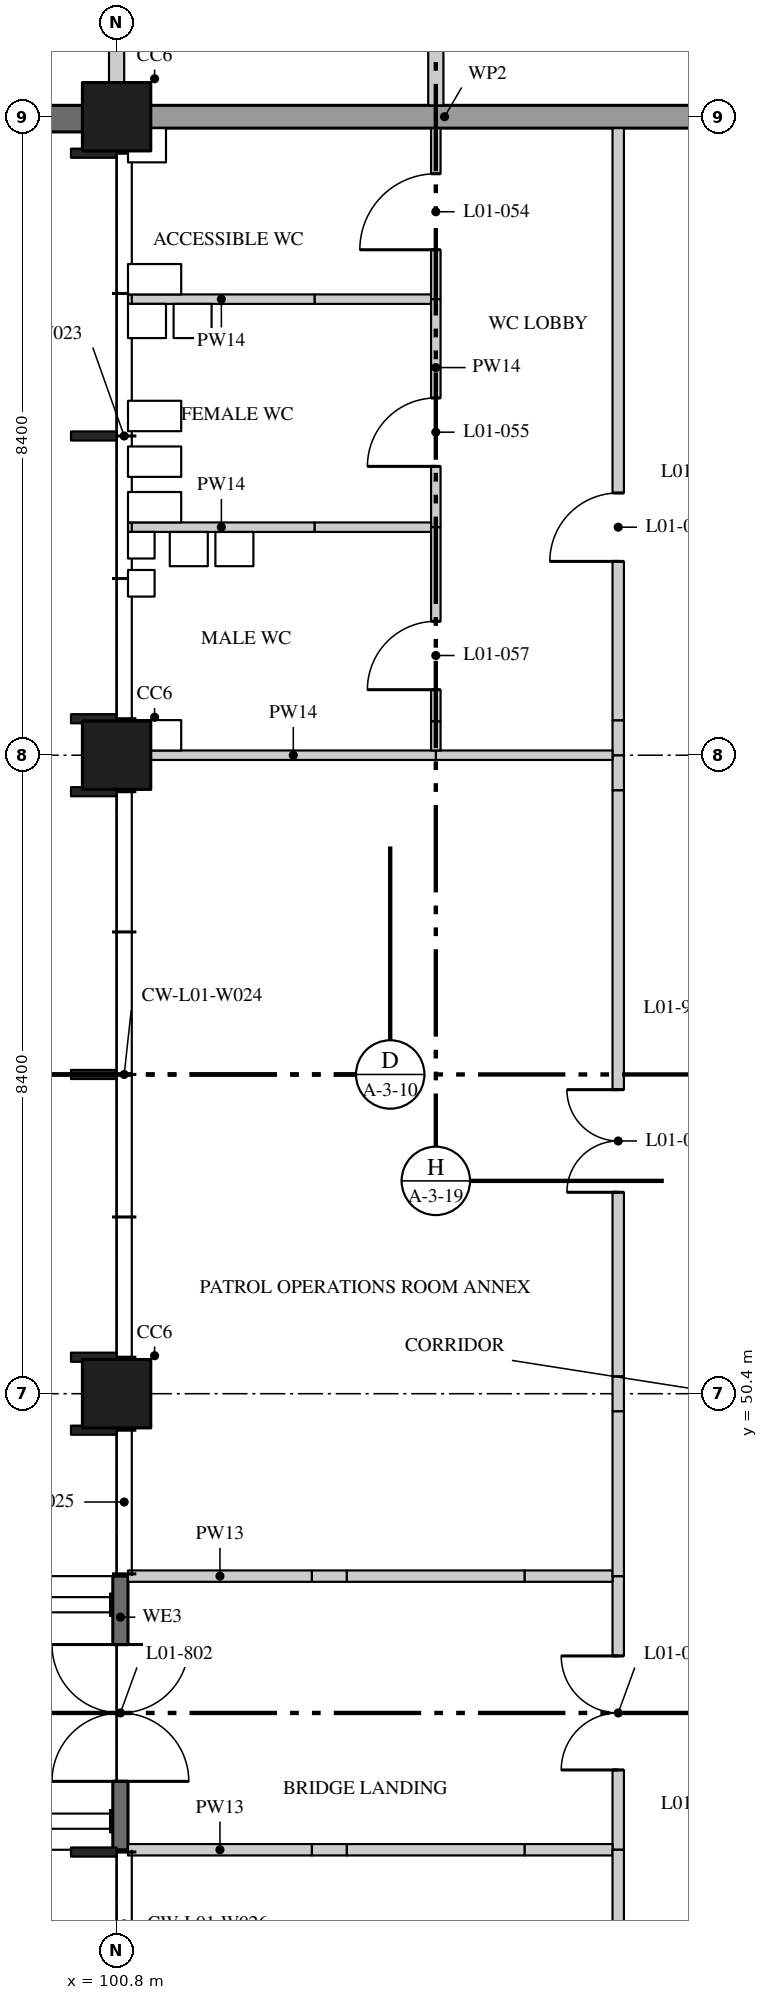
"""IFC4 building model, lengths in metres.
Left out: names, types, materials, properties, quantities, classifications, styles, units other than length and angle.
Written with IfcOpenShell. Run it as: python <this file> out.ifc"""

import sys

from ifc_helpers import new_model, si_unit, direction, frame, frame_2d, origin, origin_2d, place, context, subcontext, project, spatial, rectangle, extrude, element, fill, save


model = new_model("IFC4")
c1 = context("Model", 3, precision=1e-05, world=origin(), true_north=direction((0.0, 1.0)))
c2 = subcontext(c1, "Body", "Model", "MODEL_VIEW")
j1 = project(units=[si_unit("LENGTHUNIT", "METRE"), si_unit("PLANEANGLEUNIT", "RADIAN")], contexts=[c1])
p1 = place(None, origin())
s1 = spatial("IfcSite", under=j1, at=p1, CompositionType="ELEMENT")
p2 = place(p1, origin())
s2 = spatial("IfcBuilding", under=s1, at=p2, CompositionType="ELEMENT")
p3 = place(p2, frame((0.0, 0.0, 5.4)))
s3 = spatial("IfcBuildingStorey", under=s2, at=p3, CompositionType="ELEMENT", Elevation=5.4)
for number, where, z_axis, x_axis in (
    (1, (100.8, 50.4, 0.0), (0.0, 0.0, 1.0), (1.0, 0.0, 0.0)),
    (2, (100.8, 58.8, 0.0), (0.0, 0.0, 1.0), (1.0, 0.0, 0.0)),
    (3, (100.8, 67.2, 0.0), (0.0, 0.0, 1.0), (1.0, 0.0, 0.0)),
):
    element("IfcColumn", number, at=place(p3, frame(where, z_axis=z_axis, x_axis=x_axis)), inside=s3, PredefinedType="COLUMN", context=c2, shape_type="SweptSolid", body=[
        extrude(rectangle(XDim=0.9, YDim=0.9, at=origin_2d()), origin(), (0.0, 0.0, 1.0), 4.37),
    ])
p4 = place(p3, frame((107.4, 44.4, 0.0), z_axis=(0.0, 0.0, 1.0), x_axis=(0.0, 1.0, 0.0)))
e4 = element("IfcWall", 4, at=p4, inside=s3, PredefinedType="PARTITIONING", context=c2, shape_type="SweptSolid", body=[
    extrude(rectangle(XDim=3.6, YDim=0.15, at=frame_2d((1.8, 0.0))), origin(), (0.0, 0.0, 1.0), 4.37),
])
p5 = place(p4, frame((1.05, 0.0, 0.0)))
e5 = element("IfcOpeningElement", 5, at=p5, cuts=e4, PredefinedType="OPENING", context=c2, shape_type="SweptSolid", body=[
    extrude(rectangle(XDim=1.5, YDim=2.1, at=frame_2d((0.75, 1.05))), frame((0.0, 0.085, 0.0), z_axis=(0.0, -1.0, 0.0), x_axis=(1.0, 0.0, 0.0)), (0.0, 0.0, 1.0), 0.17),
])
p6 = place(p3, frame((100.95, 44.4, 0.0), z_axis=(0.0, 0.0, 1.0), x_axis=(1.0, 0.0, 0.0)))
e6 = element("IfcWall", 6, at=p6, inside=s3, PredefinedType="PARTITIONING", context=c2, shape_type="SweptSolid", body=[
    extrude(rectangle(XDim=2.42, YDim=0.15, at=frame_2d((1.21, 0.0))), origin(), (0.0, 0.0, 1.0), 4.37),
])
p7 = place(p3, frame((103.37, 44.4, 0.0), z_axis=(0.0, 0.0, 1.0), x_axis=(1.0, 0.0, 0.0)))
e7 = element("IfcWall", 7, at=p7, inside=s3, PredefinedType="PARTITIONING", context=c2, shape_type="SweptSolid", body=[
    extrude(rectangle(XDim=0.46, YDim=0.15, at=frame_2d((0.23, 0.0))), origin(), (0.0, 0.0, 1.0), 3.895),
])
p8 = place(p3, frame((103.83, 44.4, 0.0), z_axis=(0.0, 0.0, 1.0), x_axis=(1.0, 0.0, 0.0)))
e8 = element("IfcWall", 8, at=p8, inside=s3, PredefinedType="PARTITIONING", context=c2, shape_type="SweptSolid", body=[
    extrude(rectangle(XDim=2.34, YDim=0.15, at=frame_2d((1.17, 0.0))), origin(), (0.0, 0.0, 1.0), 4.37),
])
p9 = place(p3, frame((106.17, 44.4, 0.0), z_axis=(0.0, 0.0, 1.0), x_axis=(1.0, 0.0, 0.0)))
e9 = element("IfcWall", 9, at=p9, inside=s3, PredefinedType="PARTITIONING", context=c2, shape_type="SweptSolid", body=[
    extrude(rectangle(XDim=1.155, YDim=0.15, at=frame_2d((0.578, 0.0))), origin(), (0.0, 0.0, 1.0), 3.895),
])
p10 = place(p3, frame((100.95, 48.0, 0.0), z_axis=(0.0, 0.0, 1.0), x_axis=(1.0, 0.0, 0.0)))
e10 = element("IfcWall", 10, at=p10, inside=s3, PredefinedType="PARTITIONING", context=c2, shape_type="SweptSolid", body=[
    extrude(rectangle(XDim=2.42, YDim=0.15, at=frame_2d((1.21, 0.0))), origin(), (0.0, 0.0, 1.0), 4.37),
])
p11 = place(p3, frame((103.37, 48.0, 0.0), z_axis=(0.0, 0.0, 1.0), x_axis=(1.0, 0.0, 0.0)))
e11 = element("IfcWall", 11, at=p11, inside=s3, PredefinedType="PARTITIONING", context=c2, shape_type="SweptSolid", body=[
    extrude(rectangle(XDim=0.46, YDim=0.15, at=frame_2d((0.23, 0.0))), origin(), (0.0, 0.0, 1.0), 3.895),
])
p12 = place(p3, frame((103.83, 48.0, 0.0), z_axis=(0.0, 0.0, 1.0), x_axis=(1.0, 0.0, 0.0)))
e12 = element("IfcWall", 12, at=p12, inside=s3, PredefinedType="PARTITIONING", context=c2, shape_type="SweptSolid", body=[
    extrude(rectangle(XDim=2.34, YDim=0.15, at=frame_2d((1.17, 0.0))), origin(), (0.0, 0.0, 1.0), 4.37),
])
p13 = place(p3, frame((106.17, 48.0, 0.0), z_axis=(0.0, 0.0, 1.0), x_axis=(1.0, 0.0, 0.0)))
e13 = element("IfcWall", 13, at=p13, inside=s3, PredefinedType="PARTITIONING", context=c2, shape_type="SweptSolid", body=[
    extrude(rectangle(XDim=1.155, YDim=0.15, at=frame_2d((0.578, 0.0))), origin(), (0.0, 0.0, 1.0), 3.895),
])
for number, where, z_axis, x_axis in (
    (14, (107.4, 42.23, 0.0), (0.0, 0.0, 1.0), (0.0, 1.0, 0.0)),
    (15, (107.4, 48.0, 0.0), (0.0, 0.0, 1.0), (0.0, 1.0, 0.0)),
):
    element("IfcWall", number, at=place(p3, frame(where, z_axis=z_axis, x_axis=x_axis)), inside=s3, PredefinedType="PARTITIONING", context=c2, shape_type="SweptSolid", body=[
        extrude(rectangle(XDim=2.17, YDim=0.15, at=frame_2d((1.085, 0.0))), origin(), (0.0, 0.0, 1.0), 4.37),
    ])
p14 = place(p3, frame((107.4, 50.17, 0.0), z_axis=(0.0, 0.0, 1.0), x_axis=(0.0, 1.0, 0.0)))
e16 = element("IfcWall", 16, at=p14, inside=s3, PredefinedType="PARTITIONING", context=c2, shape_type="SweptSolid", body=[
    extrude(rectangle(XDim=0.46, YDim=0.15, at=frame_2d((0.23, 0.0))), origin(), (0.0, 0.0, 1.0), 3.746),
])
p15 = place(p3, frame((107.4, 50.63, 0.0), z_axis=(0.0, 0.0, 1.0), x_axis=(0.0, 1.0, 0.0)))
e17 = element("IfcWall", 17, at=p15, inside=s3, PredefinedType="PARTITIONING", context=c2, shape_type="SweptSolid", body=[
    extrude(rectangle(XDim=7.71, YDim=0.15, at=frame_2d((3.855, 0.0))), origin(), (0.0, 0.0, 1.0), 4.37),
])
p16 = place(p15, frame((2.42, 0.0, 0.0)))
e18 = element("IfcOpeningElement", 18, at=p16, cuts=e17, PredefinedType="OPENING", context=c2, shape_type="SweptSolid", body=[
    extrude(rectangle(XDim=1.35, YDim=2.1, at=frame_2d((0.675, 1.05))), frame((0.0, 0.085, 0.0), z_axis=(0.0, -1.0, 0.0), x_axis=(1.0, 0.0, 0.0)), (0.0, 0.0, 1.0), 0.17),
])
for number, where, z_axis, x_axis in (
    (19, (107.4, 58.34, 0.0), (0.0, 0.0, 1.0), (0.0, 1.0, 0.0)),
    (20, (107.4, 58.8, 0.0), (0.0, 0.0, 1.0), (0.0, 1.0, 0.0)),
):
    element("IfcWall", number, at=place(p3, frame(where, z_axis=z_axis, x_axis=x_axis)), inside=s3, PredefinedType="PARTITIONING", context=c2, shape_type="SweptSolid", body=[
        extrude(rectangle(XDim=0.46, YDim=0.15, at=frame_2d((0.23, 0.0))), origin(), (0.0, 0.0, 1.0), 3.746),
    ])
p17 = place(p3, frame((107.4, 59.26, 0.0), z_axis=(0.0, 0.0, 1.0), x_axis=(0.0, 1.0, 0.0)))
e21 = element("IfcWall", 21, at=p17, inside=s3, PredefinedType="PARTITIONING", context=c2, shape_type="SweptSolid", body=[
    extrude(rectangle(XDim=7.79, YDim=0.15, at=frame_2d((3.895, 0.0))), origin(), (0.0, 0.0, 1.0), 4.37),
])
p18 = place(p17, frame((2.09, 0.0, 0.0)))
e22 = element("IfcOpeningElement", 22, at=p18, cuts=e21, PredefinedType="OPENING", context=c2, shape_type="SweptSolid", body=[
    extrude(rectangle(XDim=0.9, YDim=2.1, at=frame_2d((0.45, 1.05))), frame((0.0, 0.085, 0.0), z_axis=(0.0, -1.0, 0.0), x_axis=(1.0, 0.0, 0.0)), (0.0, 0.0, 1.0), 0.17),
])
p19 = place(p3, frame((105.0, 58.8, 0.0), z_axis=(0.0, 0.0, 1.0), x_axis=(1.0, 0.0, 0.0)))
e23 = element("IfcWall", 23, at=p19, inside=s3, PredefinedType="PARTITIONING", context=c2, shape_type="SweptSolid", body=[
    extrude(rectangle(XDim=2.325, YDim=0.125, at=frame_2d((1.163, 0.0))), origin(), (0.0, 0.0, 1.0), 3.746),
])
p20 = place(p3, frame((101.25, 58.8, 0.0), z_axis=(0.0, 0.0, 1.0), x_axis=(1.0, 0.0, 0.0)))
e24 = element("IfcWall", 24, at=p20, inside=s3, PredefinedType="PARTITIONING", context=c2, shape_type="SweptSolid", body=[
    extrude(rectangle(XDim=3.75, YDim=0.125, at=frame_2d((1.875, 0.0))), origin(), (0.0, 0.0, 1.0), 3.746),
])
p21 = place(p3, frame((100.95, 64.8, 0.0), z_axis=(0.0, 0.0, 1.0), x_axis=(1.0, 0.0, 0.0)))
e25 = element("IfcWall", 25, at=p21, inside=s3, PredefinedType="PARTITIONING", context=c2, shape_type="SweptSolid", body=[
    extrude(rectangle(XDim=2.457, YDim=0.125, at=frame_2d((1.229, 0.0))), origin(), (0.0, 0.0, 1.0), 4.37),
])
p22 = place(p3, frame((103.407, 64.8, 0.0), z_axis=(0.0, 0.0, 1.0), x_axis=(1.0, 0.0, 0.0)))
e26 = element("IfcWall", 26, at=p22, inside=s3, PredefinedType="PARTITIONING", context=c2, shape_type="SweptSolid", body=[
    extrude(rectangle(XDim=1.531, YDim=0.125, at=frame_2d((0.766, 0.0))), origin(), (0.0, 0.0, 1.0), 3.895),
])
p23 = place(p3, frame((105.0, 64.8, 0.0), z_axis=(0.0, 0.0, 1.0), x_axis=(0.0, 1.0, 0.0)))
e27 = element("IfcWall", 27, at=p23, inside=s3, PredefinedType="PARTITIONING", context=c2, shape_type="SweptSolid", body=[
    extrude(rectangle(XDim=2.25, YDim=0.125, at=frame_2d((1.125, 0.0))), origin(), (0.0, 0.0, 1.0), 4.37),
])
p24 = place(p23, frame((0.65, 0.0, 0.0)))
e28 = element("IfcOpeningElement", 28, at=p24, cuts=e27, PredefinedType="OPENING", context=c2, shape_type="SweptSolid", body=[
    extrude(rectangle(XDim=1.0, YDim=2.1, at=frame_2d((0.5, 1.05))), frame((0.0, 0.073, 0.0), z_axis=(0.0, -1.0, 0.0), x_axis=(1.0, 0.0, 0.0)), (0.0, 0.0, 1.0), 0.145),
])
p25 = place(p3, frame((105.0, 61.8, 0.0), z_axis=(0.0, 0.0, 1.0), x_axis=(0.0, 1.0, 0.0)))
e29 = element("IfcWall", 29, at=p25, inside=s3, PredefinedType="PARTITIONING", context=c2, shape_type="SweptSolid", body=[
    extrude(rectangle(XDim=3.0, YDim=0.125, at=frame_2d((1.5, 0.0))), origin(), (0.0, 0.0, 1.0), 4.37),
])
p26 = place(p25, frame((0.8, 0.0, 0.0)))
e30 = element("IfcOpeningElement", 30, at=p26, cuts=e29, PredefinedType="OPENING", context=c2, shape_type="SweptSolid", body=[
    extrude(rectangle(XDim=0.9, YDim=2.1, at=frame_2d((0.45, 1.05))), frame((0.0, 0.073, 0.0), z_axis=(0.0, -1.0, 0.0), x_axis=(1.0, 0.0, 0.0)), (0.0, 0.0, 1.0), 0.145),
])
p27 = place(p3, frame((100.95, 61.8, 0.0), z_axis=(0.0, 0.0, 1.0), x_axis=(1.0, 0.0, 0.0)))
e31 = element("IfcWall", 31, at=p27, inside=s3, PredefinedType="PARTITIONING", context=c2, shape_type="SweptSolid", body=[
    extrude(rectangle(XDim=2.457, YDim=0.125, at=frame_2d((1.229, 0.0))), origin(), (0.0, 0.0, 1.0), 4.37),
])
p28 = place(p3, frame((103.407, 61.8, 0.0), z_axis=(0.0, 0.0, 1.0), x_axis=(1.0, 0.0, 0.0)))
e32 = element("IfcWall", 32, at=p28, inside=s3, PredefinedType="PARTITIONING", context=c2, shape_type="SweptSolid", body=[
    extrude(rectangle(XDim=1.531, YDim=0.125, at=frame_2d((0.766, 0.0))), origin(), (0.0, 0.0, 1.0), 3.895),
])
p29 = place(p3, frame((105.0, 58.862, 0.0), z_axis=(0.0, 0.0, 1.0), x_axis=(0.0, 1.0, 0.0)))
e33 = element("IfcWall", 33, at=p29, inside=s3, PredefinedType="PARTITIONING", context=c2, shape_type="SweptSolid", body=[
    extrude(rectangle(XDim=0.385, YDim=0.125, at=frame_2d((0.192, 0.0))), origin(), (0.0, 0.0, 1.0), 3.746),
])
p30 = place(p3, frame((105.0, 59.247, 0.0), z_axis=(0.0, 0.0, 1.0), x_axis=(0.0, 1.0, 0.0)))
e34 = element("IfcWall", 34, at=p30, inside=s3, PredefinedType="PARTITIONING", context=c2, shape_type="SweptSolid", body=[
    extrude(rectangle(XDim=2.553, YDim=0.125, at=frame_2d((1.276, 0.0))), origin(), (0.0, 0.0, 1.0), 4.37),
])
p31 = place(p30, frame((0.415, 0.0, 0.0)))
e35 = element("IfcOpeningElement", 35, at=p31, cuts=e34, PredefinedType="OPENING", context=c2, shape_type="SweptSolid", body=[
    extrude(rectangle(XDim=0.9, YDim=2.1, at=frame_2d((0.45, 1.05))), frame((0.0, 0.073, 0.0), z_axis=(0.0, -1.0, 0.0), x_axis=(1.0, 0.0, 0.0)), (0.0, 0.0, 1.0), 0.145),
])
p32 = place(p3, frame((100.8, 67.65, 0.0), z_axis=(0.0, 0.0, 1.0), x_axis=(0.0, 1.0, 0.0)))
e36 = element("IfcWall", 36, at=p32, inside=s3, PredefinedType="PARTITIONING", context=c2, shape_type="SweptSolid", body=[
    extrude(rectangle(XDim=6.35, YDim=0.2, at=frame_2d((3.175, 0.0))), origin(), (0.0, 0.0, 1.0), 3.746),
])
p33 = place(p3, frame((105.0, 67.35, 0.0), z_axis=(0.0, 0.0, 1.0), x_axis=(0.0, 1.0, 0.0)))
e37 = element("IfcWall", 37, at=p33, inside=s3, PredefinedType="PARTITIONING", context=c2, shape_type="SweptSolid", body=[
    extrude(rectangle(XDim=6.65, YDim=0.2, at=frame_2d((3.325, 0.0))), origin(), (0.0, 0.0, 1.0), 4.37),
])
p34 = place(p3, frame((92.6, 67.175, 0.0), z_axis=(0.0, 0.0, 1.0), x_axis=(1.0, 0.0, 0.0)))
e38 = element("IfcWall", 38, at=p34, inside=s3, PredefinedType="SOLIDWALL", context=c2, shape_type="SweptSolid", body=[
    extrude(rectangle(XDim=7.77, YDim=0.35, at=frame_2d((3.885, 0.0))), origin(), (0.0, 0.0, 1.0), 3.746),
])
p35 = place(p34, frame((0.7, 0.0, 1.5)))
e39 = element("IfcOpeningElement", 39, at=p35, cuts=e38, PredefinedType="OPENING", context=c2, shape_type="SweptSolid", body=[
    extrude(rectangle(XDim=0.3, YDim=1.5, at=frame_2d((0.15, 0.75))), frame((0.0, 0.185, 0.0), z_axis=(0.0, -1.0, 0.0), x_axis=(1.0, 0.0, 0.0)), (0.0, 0.0, 1.0), 0.37),
])
p36 = place(p34, frame((2.35, 0.0, 1.5)))
e40 = element("IfcOpeningElement", 40, at=p36, cuts=e38, PredefinedType="OPENING", context=c2, shape_type="SweptSolid", body=[
    extrude(rectangle(XDim=1.2, YDim=1.5, at=frame_2d((0.6, 0.75))), frame((0.0, 0.185, 0.0), z_axis=(0.0, -1.0, 0.0), x_axis=(1.0, 0.0, 0.0)), (0.0, 0.0, 1.0), 0.37),
])
p37 = place(p34, frame((4.9, 0.0, 1.5)))
e41 = element("IfcOpeningElement", 41, at=p37, cuts=e38, PredefinedType="OPENING", context=c2, shape_type="SweptSolid", body=[
    extrude(rectangle(XDim=0.3, YDim=1.5, at=frame_2d((0.15, 0.75))), frame((0.0, 0.185, 0.0), z_axis=(0.0, -1.0, 0.0), x_axis=(1.0, 0.0, 0.0)), (0.0, 0.0, 1.0), 0.37),
])
p38 = place(p3, frame((100.85, 48.0, 0.0), z_axis=(0.0, 0.0, 1.0), x_axis=(0.0, -1.0, 0.0)))
e42 = element("IfcWall", 42, at=p38, inside=s3, PredefinedType="SOLIDWALL", context=c2, shape_type="SweptSolid", body=[
    extrude(rectangle(XDim=3.6, YDim=0.2, at=frame_2d((1.8, 0.0))), origin(), (0.0, 0.0, 1.0), 3.746),
])
p39 = place(p38, frame((0.9, 0.0, 0.0)))
e43 = element("IfcOpeningElement", 43, at=p39, cuts=e42, PredefinedType="OPENING", context=c2, shape_type="SweptSolid", body=[
    extrude(rectangle(XDim=1.8, YDim=2.4, at=frame_2d((0.9, 1.2))), frame((0.0, 0.11, 0.0), z_axis=(0.0, -1.0, 0.0), x_axis=(1.0, 0.0, 0.0)), (0.0, 0.0, 1.0), 0.22),
])
p40 = place(p3, frame((109.0, 67.2, 0.0), z_axis=(0.0, 0.0, 1.0), x_axis=(-1.0, 0.0, 0.0)))
e44 = element("IfcWall", 44, at=p40, inside=s3, PredefinedType="SOLIDWALL", context=c2, shape_type="SweptSolid", body=[
    extrude(rectangle(XDim=7.77, YDim=0.3, at=frame_2d((3.885, 0.0))), origin(), (0.0, 0.0, 1.0), 3.746),
])
p41 = place(p5, origin())
e45 = element("IfcDoor", 45, at=p41, inside=s3, OperationType="DOUBLE_DOOR_SINGLE_SWING", PredefinedType="DOOR", context=c2, shape_type="SweptSolid", body=[
    extrude(rectangle(XDim=1.5, YDim=2.1, at=frame_2d((0.75, 1.05))), frame((0.0, 0.025, 0.0), z_axis=(0.0, -1.0, 0.0), x_axis=(1.0, 0.0, 0.0)), (0.0, 0.0, 1.0), 0.05),
])
fill(e5, e45)
p42 = place(p16, origin())
e46 = element("IfcDoor", 46, at=p42, inside=s3, OperationType="DOUBLE_DOOR_SINGLE_SWING", PredefinedType="DOOR", context=c2, shape_type="SweptSolid", body=[
    extrude(rectangle(XDim=1.35, YDim=2.1, at=frame_2d((0.675, 1.05))), frame((0.0, 0.025, 0.0), z_axis=(0.0, -1.0, 0.0), x_axis=(1.0, 0.0, 0.0)), (0.0, 0.0, 1.0), 0.05),
])
fill(e18, e46)
p43 = place(p24, origin())
e47 = element("IfcDoor", 47, at=p43, inside=s3, OperationType="SINGLE_SWING_RIGHT", PredefinedType="DOOR", context=c2, shape_type="SweptSolid", body=[
    extrude(rectangle(XDim=1.0, YDim=2.1, at=frame_2d((0.5, 1.05))), frame((0.0, 0.02, 0.0), z_axis=(0.0, -1.0, 0.0), x_axis=(1.0, 0.0, 0.0)), (0.0, 0.0, 1.0), 0.04),
])
fill(e28, e47)
p44 = place(p26, origin())
e48 = element("IfcDoor", 48, at=p44, inside=s3, OperationType="SINGLE_SWING_RIGHT", PredefinedType="DOOR", context=c2, shape_type="SweptSolid", body=[
    extrude(rectangle(XDim=0.9, YDim=2.1, at=frame_2d((0.45, 1.05))), frame((0.0, 0.02, 0.0), z_axis=(0.0, -1.0, 0.0), x_axis=(1.0, 0.0, 0.0)), (0.0, 0.0, 1.0), 0.04),
])
fill(e30, e48)
p45 = place(p18, origin())
e49 = element("IfcDoor", 49, at=p45, inside=s3, OperationType="SINGLE_SWING_RIGHT", PredefinedType="DOOR", context=c2, shape_type="SweptSolid", body=[
    extrude(rectangle(XDim=0.9, YDim=2.1, at=frame_2d((0.45, 1.05))), frame((0.0, 0.025, 0.0), z_axis=(0.0, -1.0, 0.0), x_axis=(1.0, 0.0, 0.0)), (0.0, 0.0, 1.0), 0.05),
])
fill(e22, e49)
p46 = place(p31, origin())
e50 = element("IfcDoor", 50, at=p46, inside=s3, OperationType="SINGLE_SWING_RIGHT", PredefinedType="DOOR", context=c2, shape_type="SweptSolid", body=[
    extrude(rectangle(XDim=0.9, YDim=2.1, at=frame_2d((0.45, 1.05))), frame((0.0, 0.02, 0.0), z_axis=(0.0, -1.0, 0.0), x_axis=(1.0, 0.0, 0.0)), (0.0, 0.0, 1.0), 0.04),
])
fill(e35, e50)
p47 = place(p39, frame((1.8, 0.0, 0.0), z_axis=(0.0, 0.0, 1.0), x_axis=(-1.0, 0.0, 0.0)))
e51 = element("IfcDoor", 51, at=p47, inside=s3, OperationType="DOUBLE_DOOR_DOUBLE_SWING", PredefinedType="DOOR", context=c2, shape_type="SweptSolid", body=[
    extrude(rectangle(XDim=1.8, YDim=2.4, at=frame_2d((0.9, 1.2))), frame((0.0, 0.025, 0.0), z_axis=(0.0, -1.0, 0.0), x_axis=(1.0, 0.0, 0.0)), (0.0, 0.0, 1.0), 0.05),
])
fill(e43, e51)
save(model, sys.argv[1])
